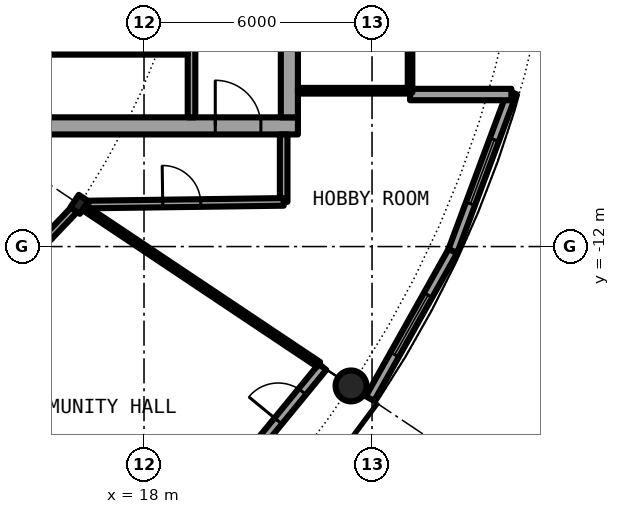
"""IFC4 building model, lengths in metres.
Left out: names, types, materials, properties, quantities, classifications, styles, units other than length and angle.
Written with IfcOpenShell. Run it as: python <this file> out.ifc"""

import sys

from ifc_helpers import new_model, si_unit, direction, frame, frame_2d, origin, origin_2d, place, context, subcontext, project, spatial, rectangle, hollow_circle, i_section, extrude, element, fill, save


model = new_model("IFC4")
c1 = context("Model", 3, precision=1e-05, world=origin(), true_north=direction((0.0, 1.0)))
c2 = subcontext(c1, "Body", "Model", "MODEL_VIEW")
j1 = project(units=[si_unit("LENGTHUNIT", "METRE"), si_unit("PLANEANGLEUNIT", "RADIAN")], contexts=[c1])
p1 = place(None, origin())
s1 = spatial("IfcSite", under=j1, at=p1, CompositionType="ELEMENT")
p2 = place(p1, origin())
s2 = spatial("IfcBuilding", under=s1, at=p2, CompositionType="ELEMENT")
p3 = place(p2, frame((0.0, 0.0, 208.5)))
s3 = spatial("IfcBuildingStorey", under=s2, at=p3, CompositionType="ELEMENT", Elevation=208.5)
p4 = place(p3, frame((23.448, -15.667, 0.0), z_axis=(0.0, 0.0, 1.0), x_axis=(1.0, 0.0, 0.0)))
e1 = element("IfcColumn", 1, at=p4, inside=s3, PredefinedType="COLUMN", context=c2, shape_type="SweptSolid", body=[
    extrude(hollow_circle(Radius=0.406, WallThickness=0.03, at=origin_2d()), origin(), (0.0, 0.0, 1.0), 4.2),
])
p5 = place(p3, frame((16.297, -10.889, 0.0), z_axis=(0.0, 0.0, 1.0), x_axis=(0.831469612303, -0.55557023302, 0.0)))
e2 = element("IfcColumn", 2, at=p5, inside=s3, PredefinedType="COLUMN", context=c2, shape_type="SweptSolid", body=[
    extrude(i_section(OverallWidth=0.3, OverallDepth=0.4, WebThickness=0.013, FlangeThickness=0.024, FilletRadius=0.027, at=origin_2d()), origin(), (0.0, 0.0, 1.0), 4.2),
])
p6 = place(p3, frame((19.304, -19.304, 0.0), z_axis=(0.0, 0.0, 1.0), x_axis=(0.634382322723, 0.773019449054, 0.0)))
e3 = element("IfcWall", 3, at=p6, inside=s3, PredefinedType="SOLIDWALL", context=c2, shape_type="SweptSolid", body=[
    extrude(rectangle(XDim=5.352, YDim=0.25, at=frame_2d((2.676, 0.0))), origin(), (0.0, 0.0, 1.0), 3.85),
])
p7 = place(p6, frame((0.841, 0.0, 0.0)))
e4 = element("IfcOpeningElement", 4, at=p7, cuts=e3, PredefinedType="OPENING", context=c2, shape_type="SweptSolid", body=[
    extrude(rectangle(XDim=1.0, YDim=2.2, at=frame_2d((0.5, 1.1))), frame((0.0, 0.135, 0.0), z_axis=(0.0, -1.0, 0.0), x_axis=(1.0, 0.0, 0.0)), (0.0, 0.0, 1.0), 0.27),
])
p8 = place(p6, frame((3.51, 0.0, 0.0)))
e5 = element("IfcOpeningElement", 5, at=p8, cuts=e3, PredefinedType="OPENING", context=c2, shape_type="SweptSolid", body=[
    extrude(rectangle(XDim=1.0, YDim=2.2, at=frame_2d((0.5, 1.1))), frame((0.0, 0.135, 0.0), z_axis=(0.0, -1.0, 0.0), x_axis=(1.0, 0.0, 0.0)), (0.0, 0.0, 1.0), 0.27),
])
p9 = place(p3, frame((23.946, -16.0, 0.0), z_axis=(0.0, 0.0, 1.0), x_axis=(0.489696356642, 0.871893042919, 0.0)))
e6 = element("IfcWall", 6, at=p9, inside=s3, PredefinedType="SOLIDWALL", context=c2, shape_type="SweptSolid", body=[
    extrude(rectangle(XDim=4.454, YDim=0.25, at=frame_2d((2.227, 0.0))), origin(), (0.0, 0.0, 1.0), 3.85),
])
p10 = place(p9, frame((1.327, 0.0, 0.3)))
e7 = element("IfcOpeningElement", 7, at=p10, cuts=e6, PredefinedType="OPENING", context=c2, shape_type="SweptSolid", body=[
    extrude(rectangle(XDim=1.8, YDim=2.1, at=frame_2d((0.9, 1.05))), frame((0.0, 0.135, 0.0), z_axis=(0.0, -1.0, 0.0), x_axis=(1.0, 0.0, 0.0)), (0.0, 0.0, 1.0), 0.27),
])
p11 = place(p3, frame((26.127, -12.117, 0.0), z_axis=(0.0, 0.0, 1.0), x_axis=(0.349247811493, 0.937030397675, 0.0)))
e8 = element("IfcWall", 8, at=p11, inside=s3, PredefinedType="SOLIDWALL", context=c2, shape_type="SweptSolid", body=[
    extrude(rectangle(XDim=4.452, YDim=0.25, at=frame_2d((2.226, 0.0))), origin(), (0.0, 0.0, 1.0), 3.85),
])
p12 = place(p11, frame((1.327, 0.0, 0.3)))
e9 = element("IfcOpeningElement", 9, at=p12, cuts=e8, PredefinedType="OPENING", context=c2, shape_type="SweptSolid", body=[
    extrude(rectangle(XDim=1.8, YDim=2.1, at=frame_2d((0.9, 1.05))), frame((0.0, 0.135, 0.0), z_axis=(0.0, -1.0, 0.0), x_axis=(1.0, 0.0, 0.0)), (0.0, 0.0, 1.0), 0.27),
])
p13 = place(p3, frame((25.0, -8.0, 0.0), z_axis=(0.0, 0.0, 1.0), x_axis=(1.0, 0.0, 0.0)))
e10 = element("IfcWall", 10, at=p13, inside=s3, PredefinedType="SOLIDWALL", context=c2, shape_type="SweptSolid", body=[
    extrude(rectangle(XDim=2.667, YDim=0.3, at=frame_2d((1.333, 0.0))), origin(), (0.0, 0.0, 1.0), 3.85),
])
p14 = place(p3, frame((8.55, -8.825, 0.0), z_axis=(0.0, 0.0, 1.0), x_axis=(1.0, 0.0, 0.0)))
e11 = element("IfcWall", 11, at=p14, inside=s3, PredefinedType="SHEAR", context=c2, shape_type="SweptSolid", body=[
    extrude(rectangle(XDim=13.5, YDim=0.45, at=frame_2d((6.75, 0.0))), origin(), (0.0, 0.0, 1.0), 4.2),
])
p15 = place(p14, frame((11.325, 0.0, 0.0)))
e12 = element("IfcOpeningElement", 12, at=p15, cuts=e11, PredefinedType="OPENING", context=c2, shape_type="SweptSolid", body=[
    extrude(rectangle(XDim=1.2, YDim=2.3, at=frame_2d((0.6, 1.15))), frame((0.0, 0.235, 0.0), z_axis=(0.0, -1.0, 0.0), x_axis=(1.0, 0.0, 0.0)), (0.0, 0.0, 1.0), 0.47),
])
p16 = place(p3, frame((21.825, 8.6, 0.0), z_axis=(0.0, 0.0, 1.0), x_axis=(0.0, -1.0, 0.0)))
e13 = element("IfcWall", 13, at=p16, inside=s3, PredefinedType="SHEAR", context=c2, shape_type="SweptSolid", body=[
    extrude(rectangle(XDim=17.2, YDim=0.45, at=frame_2d((8.6, 0.0))), origin(), (0.0, 0.0, 1.0), 4.2),
])
p17 = place(p16, frame((7.7, 0.0, 0.0)))
e14 = element("IfcOpeningElement", 14, at=p17, cuts=e13, PredefinedType="OPENING", context=c2, shape_type="SweptSolid", body=[
    extrude(rectangle(XDim=1.8, YDim=2.3, at=frame_2d((0.9, 1.15))), frame((0.0, 0.235, 0.0), z_axis=(0.0, -1.0, 0.0), x_axis=(1.0, 0.0, 0.0)), (0.0, 0.0, 1.0), 0.47),
])
p18 = place(p3, frame((19.25, -8.6, 0.0), z_axis=(0.0, 0.0, 1.0), x_axis=(0.0, 1.0, 0.0)))
e15 = element("IfcWall", 15, at=p18, inside=s3, PredefinedType="SOLIDWALL", context=c2, shape_type="SweptSolid", body=[
    extrude(rectangle(XDim=7.025, YDim=0.2, at=frame_2d((3.513, 0.0))), origin(), (0.0, 0.0, 1.0), 3.85),
])
p19 = place(p18, frame((2.35, 0.0, 0.0)))
e16 = element("IfcOpeningElement", 16, at=p19, cuts=e15, PredefinedType="OPENING", context=c2, shape_type="SweptSolid", body=[
    extrude(rectangle(XDim=1.1, YDim=2.3, at=frame_2d((0.55, 1.15))), frame((0.0, 0.11, 0.0), z_axis=(0.0, -1.0, 0.0), x_axis=(1.0, 0.0, 0.0)), (0.0, 0.0, 1.0), 0.22),
])
p20 = place(p3, frame((15.45, -6.875, 0.0), z_axis=(0.0, 0.0, 1.0), x_axis=(1.0, 0.0, 0.0)))
e17 = element("IfcWall", 17, at=p20, inside=s3, PredefinedType="PARTITIONING", context=c2, shape_type="SweptSolid", body=[
    extrude(rectangle(XDim=3.7, YDim=0.15, at=frame_2d((1.85, 0.0))), origin(), (0.0, 0.0, 1.0), 3.85),
])
p21 = place(p20, frame((1.4, 0.0, 0.0)))
e18 = element("IfcOpeningElement", 18, at=p21, cuts=e17, PredefinedType="OPENING", context=c2, shape_type="SweptSolid", body=[
    extrude(rectangle(XDim=0.9, YDim=2.3, at=frame_2d((0.45, 1.15))), frame((0.0, 0.085, 0.0), z_axis=(0.0, -1.0, 0.0), x_axis=(1.0, 0.0, 0.0)), (0.0, 0.0, 1.0), 0.17),
])
p22 = place(p3, frame((22.05, -7.9, 0.0), z_axis=(0.0, 0.0, 1.0), x_axis=(1.0, 0.0, 0.0)))
e19 = element("IfcWall", 19, at=p22, inside=s3, PredefinedType="PARTITIONING", context=c2, shape_type="SweptSolid", body=[
    extrude(rectangle(XDim=2.89, YDim=0.15, at=frame_2d((1.445, 0.0))), origin(), (0.0, 0.0, 1.0), 3.85),
])
p23 = place(p3, frame((25.0, -7.95, 0.0), z_axis=(0.0, 0.0, 1.0), x_axis=(0.0, 1.0, 0.0)))
e20 = element("IfcWall", 20, at=p23, inside=s3, PredefinedType="PARTITIONING", context=c2, shape_type="SweptSolid", body=[
    extrude(rectangle(XDim=15.9, YDim=0.12, at=frame_2d((7.95, 0.0))), origin(), (0.0, 0.0, 1.0), 3.85),
])
p24 = place(p23, frame((0.95, 0.0, 0.1)))
e21 = element("IfcOpeningElement", 21, at=p24, cuts=e20, PredefinedType="OPENING", context=c2, shape_type="SweptSolid", body=[
    extrude(rectangle(XDim=14.0, YDim=3.5, at=frame_2d((7.0, 1.75))), frame((0.0, 0.07, 0.0), z_axis=(0.0, -1.0, 0.0), x_axis=(1.0, 0.0, 0.0)), (0.0, 0.0, 1.0), 0.14),
])
p25 = place(p3, frame((21.675, -10.825, 0.0), z_axis=(0.0, 0.0, 1.0), x_axis=(0.0, 1.0, 0.0)))
e22 = element("IfcWall", 22, at=p25, inside=s3, PredefinedType="PARTITIONING", context=c2, shape_type="SweptSolid", body=[
    extrude(rectangle(XDim=1.775, YDim=0.2, at=frame_2d((0.887, 0.0))), origin(), (0.0, 0.0, 1.0), 3.85),
])
p26 = place(p3, frame((11.676, -15.743, 0.0), z_axis=(0.0, 0.0, 1.0), x_axis=(0.689484820725, 0.724300132535, 0.0)))
e23 = element("IfcWall", 23, at=p26, inside=s3, PredefinedType="PARTITIONING", context=c2, shape_type="SweptSolid", body=[
    extrude(rectangle(XDim=6.55, YDim=0.2, at=frame_2d((3.275, 0.0))), origin(), (0.0, 0.0, 1.0), 3.6),
])
p27 = place(p3, frame((16.534, -10.894, 0.0), z_axis=(0.0, 0.0, 1.0), x_axis=(0.999909707888, 0.013437859594, 0.0)))
e24 = element("IfcWall", 24, at=p27, inside=s3, PredefinedType="PARTITIONING", context=c2, shape_type="SweptSolid", body=[
    extrude(rectangle(XDim=5.142, YDim=0.2, at=frame_2d((2.571, 0.0))), origin(), (0.0, 0.0, 1.0), 3.85),
])
p28 = place(p27, frame((1.958, 0.0, 0.0)))
e25 = element("IfcOpeningElement", 25, at=p28, cuts=e24, PredefinedType="OPENING", context=c2, shape_type="SweptSolid", body=[
    extrude(rectangle(XDim=1.0, YDim=2.3, at=frame_2d((0.5, 1.15))), frame((0.0, 0.11, 0.0), z_axis=(0.0, -1.0, 0.0), x_axis=(1.0, 0.0, 0.0)), (0.0, 0.0, 1.0), 0.22),
])
p29 = place(p3, frame((16.461, -11.003, 0.0), z_axis=(0.0, 0.0, 1.0), x_axis=(0.831418274402, -0.555647057933, 0.0)))
e26 = element("IfcWall", 26, at=p29, inside=s3, PredefinedType="PARTITIONING", context=c2, shape_type="SweptSolid", body=[
    extrude(rectangle(XDim=7.375, YDim=0.15, at=frame_2d((3.688, 0.0))), origin(), (0.0, 0.0, 1.0), 3.85),
])
p30 = place(p8, origin())
e27 = element("IfcDoor", 27, at=p30, inside=s3, OperationType="SINGLE_SWING_LEFT", PredefinedType="DOOR", context=c2, shape_type="SweptSolid", body=[
    extrude(rectangle(XDim=1.0, YDim=2.2, at=frame_2d((0.5, 1.1))), frame((0.0, 0.025, 0.0), z_axis=(0.0, -1.0, 0.0), x_axis=(1.0, 0.0, 0.0)), (0.0, 0.0, 1.0), 0.05),
])
fill(e5, e27)
p31 = place(p10, origin())
e28 = element("IfcWindow", 28, at=p31, inside=s3, PartitioningType="SINGLE_PANEL", PredefinedType="WINDOW", context=c2, shape_type="SweptSolid", body=[
    extrude(rectangle(XDim=1.8, YDim=2.1, at=frame_2d((0.9, 1.05))), frame((0.0, 0.03, 0.0), z_axis=(0.0, -1.0, 0.0), x_axis=(1.0, 0.0, 0.0)), (0.0, 0.0, 1.0), 0.06),
])
fill(e7, e28)
p32 = place(p12, origin())
e29 = element("IfcWindow", 29, at=p32, inside=s3, PartitioningType="SINGLE_PANEL", PredefinedType="WINDOW", context=c2, shape_type="SweptSolid", body=[
    extrude(rectangle(XDim=1.8, YDim=2.1, at=frame_2d((0.9, 1.05))), frame((0.0, 0.03, 0.0), z_axis=(0.0, -1.0, 0.0), x_axis=(1.0, 0.0, 0.0)), (0.0, 0.0, 1.0), 0.06),
])
fill(e9, e29)
p33 = place(p21, origin())
e30 = element("IfcDoor", 30, at=p33, inside=s3, OperationType="SINGLE_SWING_LEFT", PredefinedType="DOOR", context=c2, shape_type="SweptSolid", body=[
    extrude(rectangle(XDim=0.9, YDim=2.3, at=frame_2d((0.45, 1.15))), frame((0.0, 0.025, 0.0), z_axis=(0.0, -1.0, 0.0), x_axis=(1.0, 0.0, 0.0)), (0.0, 0.0, 1.0), 0.05),
])
fill(e18, e30)
p34 = place(p15, origin())
e31 = element("IfcDoor", 31, at=p34, inside=s3, OperationType="SINGLE_SWING_LEFT", PredefinedType="DOOR", context=c2, shape_type="SweptSolid", body=[
    extrude(rectangle(XDim=1.2, YDim=2.3, at=frame_2d((0.6, 1.15))), frame((0.0, 0.025, 0.0), z_axis=(0.0, -1.0, 0.0), x_axis=(1.0, 0.0, 0.0)), (0.0, 0.0, 1.0), 0.05),
])
fill(e12, e31)
p35 = place(p24, origin())
e32 = element("IfcWindow", 32, at=p35, inside=s3, PartitioningType="SINGLE_PANEL", PredefinedType="WINDOW", context=c2, shape_type="SweptSolid", body=[
    extrude(rectangle(XDim=14.0, YDim=3.5, at=frame_2d((7.0, 1.75))), frame((0.0, 0.03, 0.0), z_axis=(0.0, -1.0, 0.0), x_axis=(1.0, 0.0, 0.0)), (0.0, 0.0, 1.0), 0.06),
])
fill(e21, e32)
p36 = place(p28, origin())
e33 = element("IfcDoor", 33, at=p36, inside=s3, OperationType="SINGLE_SWING_LEFT", PredefinedType="DOOR", context=c2, shape_type="SweptSolid", body=[
    extrude(rectangle(XDim=1.0, YDim=2.3, at=frame_2d((0.5, 1.15))), frame((0.0, 0.025, 0.0), z_axis=(0.0, -1.0, 0.0), x_axis=(1.0, 0.0, 0.0)), (0.0, 0.0, 1.0), 0.05),
])
fill(e25, e33)
save(model, sys.argv[1])
